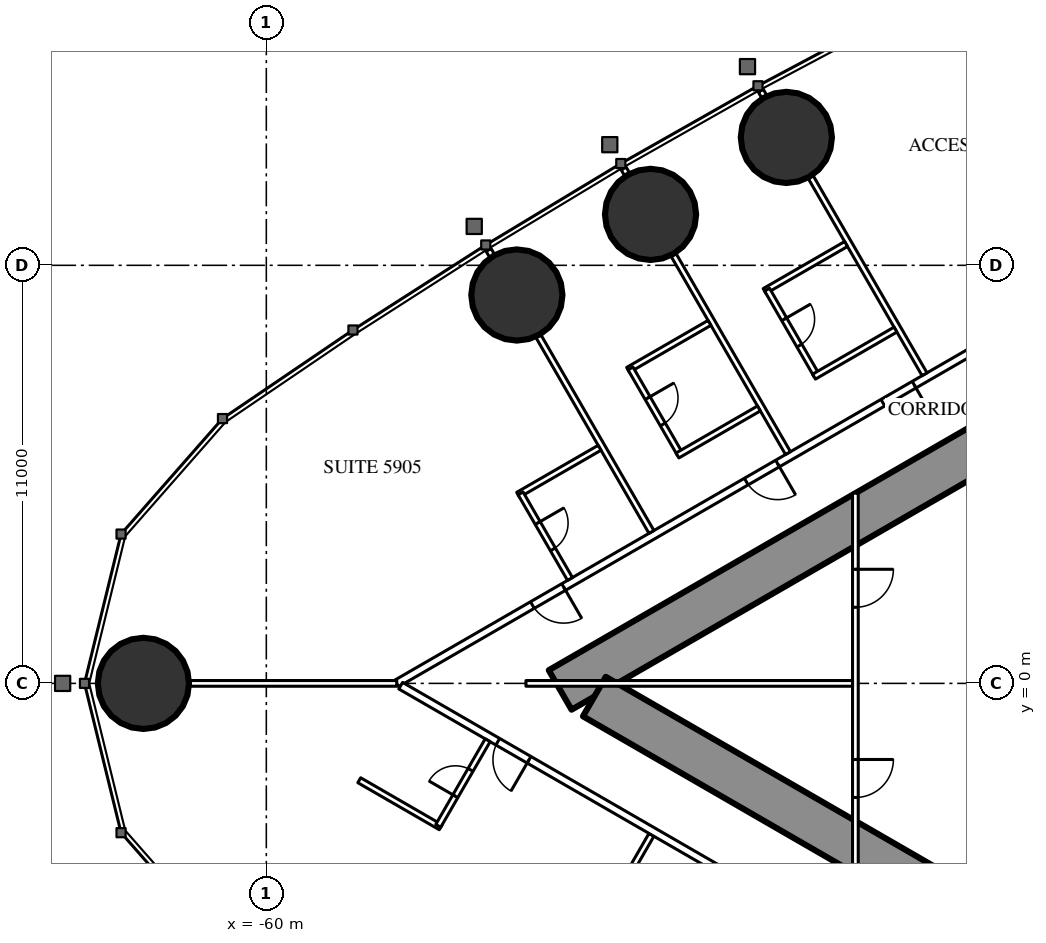
"""IFC4 building model, lengths in metres.
Left out: names, types, materials, properties, quantities, classifications, styles, units other than length and angle.
Written with IfcOpenShell. Run it as: python <this file> out.ifc"""

import sys

from ifc_helpers import new_model, si_unit, direction, frame, frame_2d, origin, origin_2d, place, context, subcontext, project, spatial, rectangle, circle, extrude, element, fill, save


model = new_model("IFC4")
c1 = context("Model", 3, precision=1e-05, world=origin(), true_north=direction((0.0, 1.0)))
c2 = subcontext(c1, "Body", "Model", "MODEL_VIEW")
j1 = project(units=[si_unit("LENGTHUNIT", "METRE"), si_unit("PLANEANGLEUNIT", "RADIAN")], contexts=[c1])
p1 = place(None, origin())
s1 = spatial("IfcSite", under=j1, at=p1, CompositionType="ELEMENT")
p2 = place(p1, origin())
s2 = spatial("IfcBuilding", under=s1, at=p2, CompositionType="ELEMENT")
p3 = place(p2, frame((0.0, 0.0, 222.5)))
s3 = spatial("IfcBuildingStorey", under=s2, at=p3, CompositionType="ELEMENT", Elevation=222.5)
for number, where, z_axis, x_axis in (
    (1, (-63.234, 0.0, 0.0), (0.0, 0.0, 1.0), (1.0, 0.0, 0.0)),
    (2, (-46.317, 14.365, 0.0), (0.0, 0.0, 1.0), (1.0, 0.0, 0.0)),
    (3, (-49.89, 12.34, 0.0), (0.0, 0.0, 1.0), (1.0, 0.0, 0.0)),
    (4, (-53.408, 10.219, 0.0), (0.0, 0.0, 1.0), (1.0, 0.0, 0.0)),
):
    element("IfcColumn", number, at=place(p3, frame(where, z_axis=z_axis, x_axis=x_axis)), inside=s3, PredefinedType="COLUMN", context=c2, shape_type="SweptSolid", body=[
        extrude(circle(Radius=1.2, at=origin_2d()), origin(), (0.0, 0.0, 1.0), 3.6),
    ])
p4 = place(p3, frame((-27.2, 14.3, 0.0), z_axis=(0.0, 0.0, 1.0), x_axis=(-0.866026593062, -0.499997940104, 0.0)))
e5 = element("IfcWall", 5, at=p4, inside=s3, PredefinedType="SHEAR", context=c2, shape_type="SweptSolid", body=[
    extrude(rectangle(XDim=28.946, YDim=1.2, at=frame_2d((14.473, 0.0))), origin(), (0.0, 0.0, 1.0), 3.6),
])
p5 = place(p4, frame((4.6, 0.0, 0.0)))
e6 = element("IfcOpeningElement", 6, at=p5, cuts=e5, PredefinedType="OPENING", context=c2, shape_type="SweptSolid", body=[
    extrude(rectangle(XDim=1.0, YDim=2.2, at=frame_2d((0.5, 1.1))), frame((0.0, 0.61, 0.0), z_axis=(0.0, -1.0, 0.0), x_axis=(1.0, 0.0, 0.0)), (0.0, 0.0, 1.0), 1.22),
])
p6 = place(p4, frame((13.395, 0.0, 0.0)))
e7 = element("IfcOpeningElement", 7, at=p6, cuts=e5, PredefinedType="OPENING", context=c2, shape_type="SweptSolid", body=[
    extrude(rectangle(XDim=1.8, YDim=2.2, at=frame_2d((0.9, 1.1))), frame((0.0, 0.61, 0.0), z_axis=(0.0, -1.0, 0.0), x_axis=(1.0, 0.0, 0.0)), (0.0, 0.0, 1.0), 1.22),
])
p7 = place(p3, frame((-27.2, -14.3, 0.0), z_axis=(0.0, 0.0, 1.0), x_axis=(-0.866024021859, 0.500002393557, 0.0)))
e8 = element("IfcWall", 8, at=p7, inside=s3, PredefinedType="SHEAR", context=c2, shape_type="SweptSolid", body=[
    extrude(rectangle(XDim=27.907, YDim=1.2, at=frame_2d((13.954, 0.0))), origin(), (0.0, 0.0, 1.0), 3.6),
])
p8 = place(p7, frame((4.6, 0.0, 0.0)))
e9 = element("IfcOpeningElement", 9, at=p8, cuts=e8, PredefinedType="OPENING", context=c2, shape_type="SweptSolid", body=[
    extrude(rectangle(XDim=1.0, YDim=2.2, at=frame_2d((0.5, 1.1))), frame((0.0, 0.61, 0.0), z_axis=(0.0, -1.0, 0.0), x_axis=(1.0, 0.0, 0.0)), (0.0, 0.0, 1.0), 1.22),
])
p9 = place(p7, frame((13.395, 0.0, 0.0)))
e10 = element("IfcOpeningElement", 10, at=p9, cuts=e8, PredefinedType="OPENING", context=c2, shape_type="SweptSolid", body=[
    extrude(rectangle(XDim=1.8, YDim=2.2, at=frame_2d((0.9, 1.1))), frame((0.0, 0.61, 0.0), z_axis=(0.0, -1.0, 0.0), x_axis=(1.0, 0.0, 0.0)), (0.0, 0.0, 1.0), 1.22),
])
p10 = place(p3, frame((-28.737, 16.068, 0.0), z_axis=(0.0, 0.0, 1.0), x_axis=(-0.866026057212, -0.499998868229, 0.0)))
e11 = element("IfcWall", 11, at=p10, inside=s3, PredefinedType="PARTITIONING", context=c2, shape_type="SweptSolid", body=[
    extrude(rectangle(XDim=32.137, YDim=0.2, at=frame_2d((16.068, 0.0))), origin(), (0.0, 0.0, 1.0), 3.35),
])
p11 = place(p10, frame((1.08, 0.0, 0.0)))
e12 = element("IfcOpeningElement", 12, at=p11, cuts=e11, PredefinedType="OPENING", context=c2, shape_type="SweptSolid", body=[
    extrude(rectangle(XDim=1.8, YDim=2.03, at=frame_2d((0.9, 1.015))), frame((0.0, 0.11, 0.0), z_axis=(0.0, -1.0, 0.0), x_axis=(1.0, 0.0, 0.0)), (0.0, 0.0, 1.0), 0.22),
])
p12 = place(p10, frame((6.86, 0.0, 0.0)))
e13 = element("IfcOpeningElement", 13, at=p12, cuts=e11, PredefinedType="OPENING", context=c2, shape_type="SweptSolid", body=[
    extrude(rectangle(XDim=1.0, YDim=2.2, at=frame_2d((0.5, 1.1))), frame((0.0, 0.11, 0.0), z_axis=(0.0, -1.0, 0.0), x_axis=(1.0, 0.0, 0.0)), (0.0, 0.0, 1.0), 0.22),
])
p13 = place(p10, frame((16.418, 0.0, 0.0)))
e14 = element("IfcOpeningElement", 14, at=p13, cuts=e11, PredefinedType="OPENING", context=c2, shape_type="SweptSolid", body=[
    extrude(rectangle(XDim=0.95, YDim=2.2, at=frame_2d((0.475, 1.1))), frame((0.0, 0.11, 0.0), z_axis=(0.0, -1.0, 0.0), x_axis=(1.0, 0.0, 0.0)), (0.0, 0.0, 1.0), 0.22),
])
p14 = place(p10, frame((20.567, 0.0, 0.0)))
e15 = element("IfcOpeningElement", 15, at=p14, cuts=e11, PredefinedType="OPENING", context=c2, shape_type="SweptSolid", body=[
    extrude(rectangle(XDim=0.95, YDim=2.2, at=frame_2d((0.475, 1.1))), frame((0.0, 0.11, 0.0), z_axis=(0.0, -1.0, 0.0), x_axis=(1.0, 0.0, 0.0)), (0.0, 0.0, 1.0), 0.22),
])
p15 = place(p10, frame((27.065, 0.0, 0.0)))
e16 = element("IfcOpeningElement", 16, at=p15, cuts=e11, PredefinedType="OPENING", context=c2, shape_type="SweptSolid", body=[
    extrude(rectangle(XDim=0.95, YDim=2.2, at=frame_2d((0.475, 1.1))), frame((0.0, 0.11, 0.0), z_axis=(0.0, -1.0, 0.0), x_axis=(1.0, 0.0, 0.0)), (0.0, 0.0, 1.0), 0.22),
])
p16 = place(p3, frame((-42.68, 8.134, 0.0), z_axis=(0.0, 0.0, 1.0), x_axis=(-0.499984479505, 0.866034364361, 0.0)))
e17 = element("IfcWall", 17, at=p16, inside=s3, PredefinedType="PARTITIONING", context=c2, shape_type="SweptSolid", body=[
    extrude(rectangle(XDim=5.995, YDim=0.15, at=frame_2d((2.998, 0.0))), origin(), (0.0, 0.0, 1.0), 2.45),
])
p17 = place(p3, frame((-46.898, 15.439, 0.0), z_axis=(0.0, 0.0, 1.0), x_axis=(-0.500232303069, 0.865891241997, 0.0)))
e18 = element("IfcWall", 18, at=p17, inside=s3, PredefinedType="PARTITIONING", context=c2, shape_type="SweptSolid", body=[
    extrude(rectangle(XDim=0.18, YDim=0.15, at=frame_2d((0.09, 0.0))), origin(), (0.0, 0.0, 1.0), 2.45),
])
p18 = place(p3, frame((-46.274, 6.059, 0.0), z_axis=(0.0, 0.0, 1.0), x_axis=(-0.500020471368, 0.866013584312, 0.0)))
e19 = element("IfcWall", 19, at=p18, inside=s3, PredefinedType="PARTITIONING", context=c2, shape_type="SweptSolid", body=[
    extrude(rectangle(XDim=6.028, YDim=0.15, at=frame_2d((3.014, 0.0))), origin(), (0.0, 0.0, 1.0), 2.45),
])
p19 = place(p3, frame((-50.508, 13.392, 0.0), z_axis=(0.0, 0.0, 1.0), x_axis=(-0.499644091975, 0.866230789891, 0.0)))
e20 = element("IfcWall", 20, at=p19, inside=s3, PredefinedType="PARTITIONING", context=c2, shape_type="SweptSolid", body=[
    extrude(rectangle(XDim=0.18, YDim=0.15, at=frame_2d((0.09, 0.0))), origin(), (0.0, 0.0, 1.0), 2.45),
])
p20 = place(p3, frame((-49.866, 3.985, 0.0), z_axis=(0.0, 0.0, 1.0), x_axis=(-0.500000694566, 0.866025002776, 0.0)))
e21 = element("IfcWall", 21, at=p20, inside=s3, PredefinedType="PARTITIONING", context=c2, shape_type="SweptSolid", body=[
    extrude(rectangle(XDim=5.95, YDim=0.15, at=frame_2d((2.975, 0.0))), origin(), (0.0, 0.0, 1.0), 2.45),
])
p21 = place(p3, frame((-54.061, 11.25, 0.0), z_axis=(0.0, 0.0, 1.0), x_axis=(-0.500391173478, 0.865799441849, 0.0)))
e22 = element("IfcWall", 22, at=p21, inside=s3, PredefinedType="PARTITIONING", context=c2, shape_type="SweptSolid", body=[
    extrude(rectangle(XDim=0.179, YDim=0.15, at=frame_2d((0.089, 0.0))), origin(), (0.0, 0.0, 1.0), 2.45),
])
p22 = place(p3, frame((-49.866, -3.985, 0.0), z_axis=(0.0, 0.0, 1.0), x_axis=(-0.500000694566, -0.866025002776, 0.0)))
e23 = element("IfcWall", 23, at=p22, inside=s3, PredefinedType="PARTITIONING", context=c2, shape_type="SweptSolid", body=[
    extrude(rectangle(XDim=5.95, YDim=0.15, at=frame_2d((2.975, 0.0))), origin(), (0.0, 0.0, 1.0), 2.45),
])
p23 = place(p22, frame((3.5, 0.0, 0.0)))
e24 = element("IfcOpeningElement", 24, at=p23, cuts=e23, PredefinedType="OPENING", context=c2, shape_type="SweptSolid", body=[
    extrude(rectangle(XDim=0.9, YDim=2.2, at=frame_2d((0.45, 1.1))), frame((0.0, 0.085, 0.0), z_axis=(0.0, -1.0, 0.0), x_axis=(1.0, 0.0, 0.0)), (0.0, 0.0, 1.0), 0.17),
])
p24 = place(p3, frame((-56.568, 0.0, 0.0), z_axis=(0.0, 0.0, 1.0), x_axis=(-1.0, 0.0, 0.0)))
e25 = element("IfcWall", 25, at=p24, inside=s3, PredefinedType="PARTITIONING", context=c2, shape_type="SweptSolid", body=[
    extrude(rectangle(XDim=5.446, YDim=0.15, at=frame_2d((2.723, 0.0))), origin(), (0.0, 0.0, 1.0), 2.45),
])
p25 = place(p3, frame((-44.715, -6.844, 0.0), z_axis=(0.0, 0.0, 1.0), x_axis=(-0.866025261224, 0.500000246922, 0.0)))
e26 = element("IfcWall", 26, at=p25, inside=s3, PredefinedType="PARTITIONING", context=c2, shape_type="SweptSolid", body=[
    extrude(rectangle(XDim=13.567, YDim=0.2, at=frame_2d((6.783, 0.0))), origin(), (0.0, 0.0, 1.0), 3.35),
])
p26 = place(p25, frame((9.667, 0.0, 0.0)))
e27 = element("IfcOpeningElement", 27, at=p26, cuts=e26, PredefinedType="OPENING", context=c2, shape_type="SweptSolid", body=[
    extrude(rectangle(XDim=0.95, YDim=2.2, at=frame_2d((0.475, 1.1))), frame((0.0, 0.11, 0.0), z_axis=(0.0, -1.0, 0.0), x_axis=(1.0, 0.0, 0.0)), (0.0, 0.0, 1.0), 0.22),
])
p27 = place(p25, frame((2.117, 0.0, 0.0)))
e28 = element("IfcOpeningElement", 28, at=p27, cuts=e26, PredefinedType="OPENING", context=c2, shape_type="SweptSolid", body=[
    extrude(rectangle(XDim=0.95, YDim=2.2, at=frame_2d((0.475, 1.1))), frame((0.0, 0.11, 0.0), z_axis=(0.0, -1.0, 0.0), x_axis=(1.0, 0.0, 0.0)), (0.0, 0.0, 1.0), 0.22),
])
p28 = place(p25, frame((0.5, 0.0, 0.0)))
e29 = element("IfcOpeningElement", 29, at=p28, cuts=e26, PredefinedType="OPENING", context=c2, shape_type="SweptSolid", body=[
    extrude(rectangle(XDim=0.967, YDim=2.2, at=frame_2d((0.483, 1.1))), frame((0.0, 0.11, 0.0), z_axis=(0.0, -1.0, 0.0), x_axis=(1.0, 0.0, 0.0)), (0.0, 0.0, 1.0), 0.22),
])
p29 = place(p3, frame((-44.745, 11.56, 0.0), z_axis=(0.0, 0.0, 1.0), x_axis=(-0.866006523861, -0.500032699561, 0.0)))
e30 = element("IfcWall", 30, at=p29, inside=s3, PredefinedType="PARTITIONING", context=c2, shape_type="SweptSolid", body=[
    extrude(rectangle(XDim=2.475, YDim=0.15, at=frame_2d((1.237, 0.0))), origin(), (0.0, 0.0, 1.0), 3.35),
])
p30 = place(p3, frame((-45.524, 8.109, 0.0), z_axis=(0.0, 0.0, 1.0), x_axis=(-0.49997716683, 0.86603858612, 0.0)))
e31 = element("IfcWall", 31, at=p30, inside=s3, PredefinedType="PARTITIONING", context=c2, shape_type="SweptSolid", body=[
    extrude(rectangle(XDim=2.6, YDim=0.15, at=frame_2d((1.3, 0.0))), origin(), (0.0, 0.0, 1.0), 3.35),
])
p31 = place(p30, frame((0.9, 0.0, 0.0)))
e32 = element("IfcOpeningElement", 32, at=p31, cuts=e31, PredefinedType="OPENING", context=c2, shape_type="SweptSolid", body=[
    extrude(rectangle(XDim=0.8, YDim=2.2, at=frame_2d((0.4, 1.1))), frame((0.0, 0.085, 0.0), z_axis=(0.0, -1.0, 0.0), x_axis=(1.0, 0.0, 0.0)), (0.0, 0.0, 1.0), 0.17),
])
p32 = place(p3, frame((-43.445, 9.309, 0.0), z_axis=(0.0, 0.0, 1.0), x_axis=(-0.866031185235, -0.4999899861, 0.0)))
e33 = element("IfcWall", 33, at=p32, inside=s3, PredefinedType="PARTITIONING", context=c2, shape_type="SweptSolid", body=[
    extrude(rectangle(XDim=2.475, YDim=0.15, at=frame_2d((1.238, 0.0))), origin(), (0.0, 0.0, 1.0), 3.35),
])
p33 = place(p3, frame((-48.339, 9.486, 0.0), z_axis=(0.0, 0.0, 1.0), x_axis=(-0.866006523861, -0.500032699561, 0.0)))
e34 = element("IfcWall", 34, at=p33, inside=s3, PredefinedType="PARTITIONING", context=c2, shape_type="SweptSolid", body=[
    extrude(rectangle(XDim=2.475, YDim=0.15, at=frame_2d((1.237, 0.0))), origin(), (0.0, 0.0, 1.0), 3.35),
])
p34 = place(p3, frame((-49.117, 6.034, 0.0), z_axis=(0.0, 0.0, 1.0), x_axis=(-0.500006934395, 0.866021400173, 0.0)))
e35 = element("IfcWall", 35, at=p34, inside=s3, PredefinedType="PARTITIONING", context=c2, shape_type="SweptSolid", body=[
    extrude(rectangle(XDim=2.6, YDim=0.15, at=frame_2d((1.3, 0.0))), origin(), (0.0, 0.0, 1.0), 3.35),
])
p35 = place(p34, frame((0.9, 0.0, 0.0)))
e36 = element("IfcOpeningElement", 36, at=p35, cuts=e35, PredefinedType="OPENING", context=c2, shape_type="SweptSolid", body=[
    extrude(rectangle(XDim=0.8, YDim=2.2, at=frame_2d((0.4, 1.1))), frame((0.0, 0.085, 0.0), z_axis=(0.0, -1.0, 0.0), x_axis=(1.0, 0.0, 0.0)), (0.0, 0.0, 1.0), 0.17),
])
for number, where, z_axis, x_axis in (
    (37, (-47.039, 7.234, 0.0), (0.0, 0.0, 1.0), (-0.866, -0.5, 0.0)),
    (38, (-51.231, 6.199, 0.0), (0.0, 0.0, 1.0), (-0.866, -0.5, 0.0)),
):
    element("IfcWall", number, at=place(p3, frame(where, z_axis=z_axis, x_axis=x_axis)), inside=s3, PredefinedType="PARTITIONING", context=c2, shape_type="SweptSolid", body=[
        extrude(rectangle(XDim=2.475, YDim=0.15, at=frame_2d((1.238, 0.0))), origin(), (0.0, 0.0, 1.0), 3.35),
    ])
p36 = place(p3, frame((-52.01, 2.747, 0.0), z_axis=(0.0, 0.0, 1.0), x_axis=(-0.500006934395, 0.866021400173, 0.0)))
e39 = element("IfcWall", 39, at=p36, inside=s3, PredefinedType="PARTITIONING", context=c2, shape_type="SweptSolid", body=[
    extrude(rectangle(XDim=2.6, YDim=0.15, at=frame_2d((1.3, 0.0))), origin(), (0.0, 0.0, 1.0), 3.35),
])
p37 = place(p36, frame((0.9, 0.0, 0.0)))
e40 = element("IfcOpeningElement", 40, at=p37, cuts=e39, PredefinedType="OPENING", context=c2, shape_type="SweptSolid", body=[
    extrude(rectangle(XDim=0.8, YDim=2.2, at=frame_2d((0.4, 1.1))), frame((0.0, 0.085, 0.0), z_axis=(0.0, -1.0, 0.0), x_axis=(1.0, 0.0, 0.0)), (0.0, 0.0, 1.0), 0.17),
])
p38 = place(p3, frame((-55.411, -3.786, 0.0), z_axis=(0.0, 0.0, 1.0), x_axis=(-0.866006523861, 0.500032699561, 0.0)))
e41 = element("IfcWall", 41, at=p38, inside=s3, PredefinedType="PARTITIONING", context=c2, shape_type="SweptSolid", body=[
    extrude(rectangle(XDim=2.475, YDim=0.15, at=frame_2d((1.237, 0.0))), origin(), (0.0, 0.0, 1.0), 3.35),
])
p39 = place(p3, frame((-54.176, -1.497, 0.0), z_axis=(0.0, 0.0, 1.0), x_axis=(-0.500006934395, -0.866021400173, 0.0)))
e42 = element("IfcWall", 42, at=p39, inside=s3, PredefinedType="PARTITIONING", context=c2, shape_type="SweptSolid", body=[
    extrude(rectangle(XDim=2.6, YDim=0.15, at=frame_2d((1.3, 0.0))), origin(), (0.0, 0.0, 1.0), 3.35),
])
p40 = place(p39, frame((0.9, 0.0, 0.0)))
e43 = element("IfcOpeningElement", 43, at=p40, cuts=e42, PredefinedType="OPENING", context=c2, shape_type="SweptSolid", body=[
    extrude(rectangle(XDim=0.8, YDim=2.2, at=frame_2d((0.4, 1.1))), frame((0.0, 0.085, 0.0), z_axis=(0.0, -1.0, 0.0), x_axis=(1.0, 0.0, 0.0)), (0.0, 0.0, 1.0), 0.17),
])
p41 = place(p3, frame((-44.5, 5.005, 0.0), z_axis=(0.0, 0.0, 1.0), x_axis=(0.0, -1.0, 0.0)))
e44 = element("IfcWall", 44, at=p41, inside=s3, PredefinedType="PARTITIONING", context=c2, shape_type="SweptSolid", body=[
    extrude(rectangle(XDim=10.009, YDim=0.15, at=frame_2d((5.005, 0.0))), origin(), (0.0, 0.0, 1.0), 2.5),
])
p42 = place(p41, frame((2.002, 0.0, 0.0)))
e45 = element("IfcOpeningElement", 45, at=p42, cuts=e44, PredefinedType="OPENING", context=c2, shape_type="SweptSolid", body=[
    extrude(rectangle(XDim=1.0, YDim=2.2, at=frame_2d((0.5, 1.1))), frame((0.0, 0.085, 0.0), z_axis=(0.0, -1.0, 0.0), x_axis=(1.0, 0.0, 0.0)), (0.0, 0.0, 1.0), 0.17),
])
p43 = place(p41, frame((7.007, 0.0, 0.0)))
e46 = element("IfcOpeningElement", 46, at=p43, cuts=e44, PredefinedType="OPENING", context=c2, shape_type="SweptSolid", body=[
    extrude(rectangle(XDim=1.0, YDim=2.2, at=frame_2d((0.5, 1.1))), frame((0.0, 0.085, 0.0), z_axis=(0.0, -1.0, 0.0), x_axis=(1.0, 0.0, 0.0)), (0.0, 0.0, 1.0), 0.17),
])
p44 = place(p3, frame((-44.575, 0.0, 0.0), z_axis=(0.0, 0.0, 1.0), x_axis=(-1.0, 0.0, 0.0)))
e47 = element("IfcWall", 47, at=p44, inside=s3, PredefinedType="PARTITIONING", context=c2, shape_type="SweptSolid", body=[
    extrude(rectangle(XDim=8.593, YDim=0.15, at=frame_2d((4.297, 0.0))), origin(), (0.0, 0.0, 1.0), 2.45),
])
p45 = place(p31, origin())
e48 = element("IfcDoor", 48, at=p45, inside=s3, OperationType="SINGLE_SWING_RIGHT", PredefinedType="DOOR", context=c2, shape_type="SweptSolid", body=[
    extrude(rectangle(XDim=0.8, YDim=2.2, at=frame_2d((0.4, 1.1))), frame((0.0, 0.025, 0.0), z_axis=(0.0, -1.0, 0.0), x_axis=(1.0, 0.0, 0.0)), (0.0, 0.0, 1.0), 0.05),
])
fill(e32, e48)
p46 = place(p13, origin())
e49 = element("IfcDoor", 49, at=p46, inside=s3, OperationType="SINGLE_SWING_LEFT", PredefinedType="DOOR", context=c2, shape_type="SweptSolid", body=[
    extrude(rectangle(XDim=0.95, YDim=2.2, at=frame_2d((0.475, 1.1))), frame((0.0, 0.025, 0.0), z_axis=(0.0, -1.0, 0.0), x_axis=(1.0, 0.0, 0.0)), (0.0, 0.0, 1.0), 0.05),
])
fill(e14, e49)
p47 = place(p35, origin())
e50 = element("IfcDoor", 50, at=p47, inside=s3, OperationType="SINGLE_SWING_RIGHT", PredefinedType="DOOR", context=c2, shape_type="SweptSolid", body=[
    extrude(rectangle(XDim=0.8, YDim=2.2, at=frame_2d((0.4, 1.1))), frame((0.0, 0.025, 0.0), z_axis=(0.0, -1.0, 0.0), x_axis=(1.0, 0.0, 0.0)), (0.0, 0.0, 1.0), 0.05),
])
fill(e36, e50)
p48 = place(p14, origin())
e51 = element("IfcDoor", 51, at=p48, inside=s3, OperationType="SINGLE_SWING_LEFT", PredefinedType="DOOR", context=c2, shape_type="SweptSolid", body=[
    extrude(rectangle(XDim=0.95, YDim=2.2, at=frame_2d((0.475, 1.1))), frame((0.0, 0.025, 0.0), z_axis=(0.0, -1.0, 0.0), x_axis=(1.0, 0.0, 0.0)), (0.0, 0.0, 1.0), 0.05),
])
fill(e15, e51)
p49 = place(p37, origin())
e52 = element("IfcDoor", 52, at=p49, inside=s3, OperationType="SINGLE_SWING_RIGHT", PredefinedType="DOOR", context=c2, shape_type="SweptSolid", body=[
    extrude(rectangle(XDim=0.8, YDim=2.2, at=frame_2d((0.4, 1.1))), frame((0.0, 0.025, 0.0), z_axis=(0.0, -1.0, 0.0), x_axis=(1.0, 0.0, 0.0)), (0.0, 0.0, 1.0), 0.05),
])
fill(e40, e52)
p50 = place(p15, origin())
e53 = element("IfcDoor", 53, at=p50, inside=s3, OperationType="SINGLE_SWING_LEFT", PredefinedType="DOOR", context=c2, shape_type="SweptSolid", body=[
    extrude(rectangle(XDim=0.95, YDim=2.2, at=frame_2d((0.475, 1.1))), frame((0.0, 0.025, 0.0), z_axis=(0.0, -1.0, 0.0), x_axis=(1.0, 0.0, 0.0)), (0.0, 0.0, 1.0), 0.05),
])
fill(e16, e53)
p51 = place(p40, origin())
e54 = element("IfcDoor", 54, at=p51, inside=s3, OperationType="SINGLE_SWING_RIGHT", PredefinedType="DOOR", context=c2, shape_type="SweptSolid", body=[
    extrude(rectangle(XDim=0.8, YDim=2.2, at=frame_2d((0.4, 1.1))), frame((0.0, 0.025, 0.0), z_axis=(0.0, -1.0, 0.0), x_axis=(1.0, 0.0, 0.0)), (0.0, 0.0, 1.0), 0.05),
])
fill(e43, e54)
p52 = place(p26, origin())
e55 = element("IfcDoor", 55, at=p52, inside=s3, OperationType="SINGLE_SWING_LEFT", PredefinedType="DOOR", context=c2, shape_type="SweptSolid", body=[
    extrude(rectangle(XDim=0.95, YDim=2.2, at=frame_2d((0.475, 1.1))), frame((0.0, 0.025, 0.0), z_axis=(0.0, -1.0, 0.0), x_axis=(1.0, 0.0, 0.0)), (0.0, 0.0, 1.0), 0.05),
])
fill(e27, e55)
p53 = place(p42, origin())
e56 = element("IfcDoor", 56, at=p53, inside=s3, OperationType="SINGLE_SWING_LEFT", PredefinedType="DOOR", context=c2, shape_type="SweptSolid", body=[
    extrude(rectangle(XDim=1.0, YDim=2.2, at=frame_2d((0.5, 1.1))), frame((0.0, 0.025, 0.0), z_axis=(0.0, -1.0, 0.0), x_axis=(1.0, 0.0, 0.0)), (0.0, 0.0, 1.0), 0.05),
])
fill(e45, e56)
p54 = place(p43, origin())
e57 = element("IfcDoor", 57, at=p54, inside=s3, OperationType="SINGLE_SWING_LEFT", PredefinedType="DOOR", context=c2, shape_type="SweptSolid", body=[
    extrude(rectangle(XDim=1.0, YDim=2.2, at=frame_2d((0.5, 1.1))), frame((0.0, 0.025, 0.0), z_axis=(0.0, -1.0, 0.0), x_axis=(1.0, 0.0, 0.0)), (0.0, 0.0, 1.0), 0.05),
])
fill(e46, e57)
save(model, sys.argv[1])
